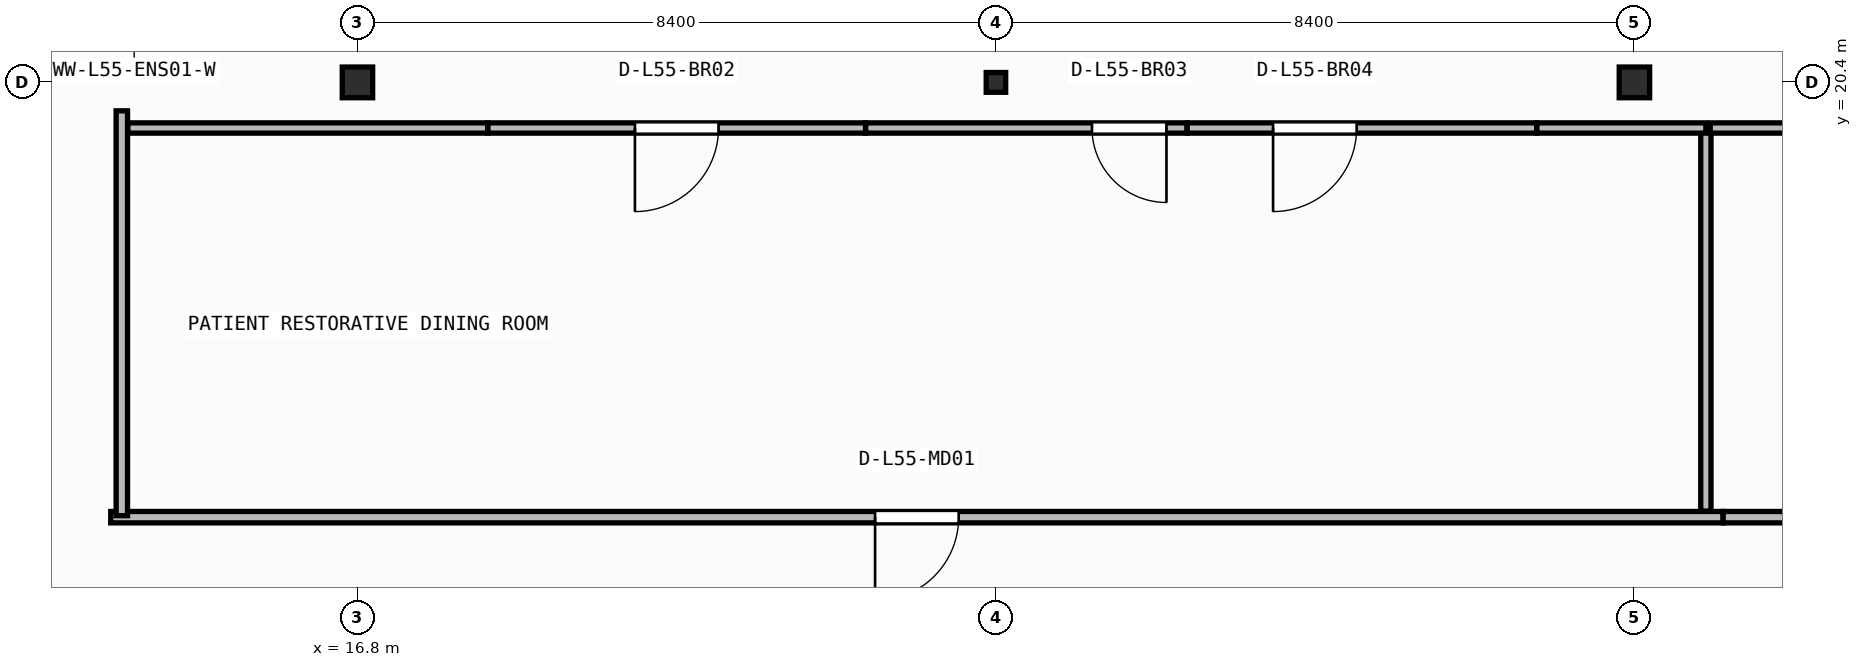
"""IFC4 building model, lengths in metres.
Left out: names, types, materials, properties, quantities, classifications, styles, units other than length and angle.
Written with IfcOpenShell. Run it as: python <this file> out.ifc"""

import sys

from ifc_helpers import new_model, si_unit, direction, frame, frame_2d, origin, origin_2d, place, context, subcontext, project, spatial, rectangle, i_section, extrude, element, fill, save


model = new_model("IFC4")
c1 = context("Model", 3, precision=1e-05, world=origin(), true_north=direction((0.0, 1.0)))
c2 = subcontext(c1, "Body", "Model", "MODEL_VIEW")
j1 = project(units=[si_unit("LENGTHUNIT", "METRE"), si_unit("PLANEANGLEUNIT", "RADIAN")], contexts=[c1])
p1 = place(None, origin())
s1 = spatial("IfcSite", under=j1, at=p1, CompositionType="ELEMENT")
p2 = place(p1, origin())
s2 = spatial("IfcBuilding", under=s1, at=p2, CompositionType="ELEMENT")
p3 = place(p2, frame((0.0, 0.0, 223.7)))
s3 = spatial("IfcBuildingStorey", under=s2, at=p3, CompositionType="ELEMENT", Elevation=223.7)
p4 = place(p3, frame((16.8, 20.4, 0.0), z_axis=(0.0, 0.0, 1.0), x_axis=(1.0, 0.0, 0.0)))
e1 = element("IfcColumn", 1, at=p4, inside=s3, PredefinedType="COLUMN", context=c2, shape_type="SweptSolid", body=[
    extrude(i_section(OverallWidth=0.4, OverallDepth=0.404, WebThickness=0.02, FlangeThickness=0.032, at=origin_2d()), origin(), (0.0, 0.0, 1.0), 3.95),
])
p5 = place(p3, frame((25.2, 20.4, 0.0), z_axis=(0.0, 0.0, 1.0), x_axis=(1.0, 0.0, 0.0)))
e2 = element("IfcColumn", 2, at=p5, inside=s3, PredefinedType="COLUMN", context=c2, shape_type="SweptSolid", body=[
    extrude(i_section(OverallWidth=0.256, OverallDepth=0.26, WebThickness=0.01, FlangeThickness=0.017, FilletRadius=0.013, at=origin_2d()), origin(), (0.0, 0.0, 1.0), 3.95),
])
p6 = place(p3, frame((33.6, 20.4, 0.0), z_axis=(0.0, 0.0, 1.0), x_axis=(1.0, 0.0, 0.0)))
e3 = element("IfcColumn", 3, at=p6, inside=s3, PredefinedType="COLUMN", context=c2, shape_type="SweptSolid", body=[
    extrude(i_section(OverallWidth=0.4, OverallDepth=0.404, WebThickness=0.02, FlangeThickness=0.032, at=origin_2d()), origin(), (0.0, 0.0, 1.0), 3.95),
])
p7 = place(p3, frame((34.766, 14.68, 0.0), z_axis=(0.0, 0.0, 1.0), x_axis=(-1.0, 0.0, 0.0)))
e4 = element("IfcWall", 4, at=p7, inside=s3, PredefinedType="PARTITIONING", context=c2, shape_type="SweptSolid", body=[
    extrude(rectangle(XDim=21.212, YDim=0.15, at=frame_2d((10.606, 0.0))), origin(), (0.0, 0.0, 1.0), 3.71),
])
p8 = place(p7, frame((10.056, 0.0, 0.0)))
e5 = element("IfcOpeningElement", 5, at=p8, cuts=e4, PredefinedType="OPENING", context=c2, shape_type="SweptSolid", body=[
    extrude(rectangle(XDim=1.1, YDim=2.1, at=frame_2d((0.55, 1.05))), frame((0.0, 0.085, 0.0), z_axis=(0.0, -1.0, 0.0), x_axis=(1.0, 0.0, 0.0)), (0.0, 0.0, 1.0), 0.17),
])
p9 = place(p3, frame((51.04, 14.68, 0.0), z_axis=(0.0, 0.0, 1.0), x_axis=(-1.0, 0.0, 0.0)))
e6 = element("IfcWall", 6, at=p9, inside=s3, PredefinedType="PARTITIONING", context=c2, shape_type="SweptSolid", body=[
    extrude(rectangle(XDim=16.272, YDim=0.15, at=frame_2d((8.136, 0.0))), origin(), (0.0, 0.0, 1.0), 3.71),
])
p10 = place(p9, frame((7.586, 0.0, 0.0)))
e7 = element("IfcOpeningElement", 7, at=p10, cuts=e6, PredefinedType="OPENING", context=c2, shape_type="SweptSolid", body=[
    extrude(rectangle(XDim=1.1, YDim=2.1, at=frame_2d((0.55, 1.05))), frame((0.0, 0.085, 0.0), z_axis=(0.0, -1.0, 0.0), x_axis=(1.0, 0.0, 0.0)), (0.0, 0.0, 1.0), 0.17),
])
p11 = place(p3, frame((13.7, 14.7, 0.0), z_axis=(0.0, 0.0, 1.0), x_axis=(0.0, 1.0, 0.0)))
e8 = element("IfcWall", 8, at=p11, inside=s3, PredefinedType="PARTITIONING", context=c2, shape_type="SweptSolid", body=[
    extrude(rectangle(XDim=5.326, YDim=0.15, at=frame_2d((2.663, 0.0))), origin(), (0.0, 0.0, 1.0), 3.71),
])
p12 = place(p3, frame((34.54, 14.76, 0.0), z_axis=(0.0, 0.0, 1.0), x_axis=(0.0, 1.0, 0.0)))
e9 = element("IfcWall", 9, at=p12, inside=s3, PredefinedType="PARTITIONING", context=c2, shape_type="SweptSolid", body=[
    extrude(rectangle(XDim=5.04, YDim=0.135, at=frame_2d((2.52, 0.0))), origin(), (0.0, 0.0, 1.0), 3.71),
])
p13 = place(p3, frame((18.515, 19.8, 0.0), z_axis=(0.0, 0.0, 1.0), x_axis=(-1.0, 0.0, 0.0)))
e10 = element("IfcWall", 10, at=p13, inside=s3, PredefinedType="PARTITIONING", context=c2, shape_type="SweptSolid", body=[
    extrude(rectangle(XDim=4.735, YDim=0.135, at=frame_2d((2.367, 0.0))), origin(), (0.0, 0.0, 1.0), 3.71),
])
p14 = place(p3, frame((23.485, 19.8, 0.0), z_axis=(0.0, 0.0, 1.0), x_axis=(-1.0, 0.0, 0.0)))
e11 = element("IfcWall", 11, at=p14, inside=s3, PredefinedType="PARTITIONING", context=c2, shape_type="SweptSolid", body=[
    extrude(rectangle(XDim=4.968, YDim=0.135, at=frame_2d((2.484, 0.0))), origin(), (0.0, 0.0, 1.0), 3.71),
])
p15 = place(p14, frame((1.934, 0.0, 0.0)))
e12 = element("IfcOpeningElement", 12, at=p15, cuts=e11, PredefinedType="OPENING", context=c2, shape_type="SweptSolid", body=[
    extrude(rectangle(XDim=1.1, YDim=2.1, at=frame_2d((0.55, 1.05))), frame((0.0, 0.077, 0.0), z_axis=(0.0, -1.0, 0.0), x_axis=(1.0, 0.0, 0.0)), (0.0, 0.0, 1.0), 0.155),
])
p16 = place(p3, frame((27.715, 19.8, 0.0), z_axis=(0.0, 0.0, 1.0), x_axis=(-1.0, 0.0, 0.0)))
e13 = element("IfcWall", 13, at=p16, inside=s3, PredefinedType="PARTITIONING", context=c2, shape_type="SweptSolid", body=[
    extrude(rectangle(XDim=4.228, YDim=0.135, at=frame_2d((2.114, 0.0))), origin(), (0.0, 0.0, 1.0), 3.71),
])
p17 = place(p16, frame((0.271, 0.0, 0.0)))
e14 = element("IfcOpeningElement", 14, at=p17, cuts=e13, PredefinedType="OPENING", context=c2, shape_type="SweptSolid", body=[
    extrude(rectangle(XDim=0.98, YDim=2.1, at=frame_2d((0.49, 1.05))), frame((0.0, 0.077, 0.0), z_axis=(0.0, -1.0, 0.0), x_axis=(1.0, 0.0, 0.0)), (0.0, 0.0, 1.0), 0.155),
])
p18 = place(p3, frame((32.315, 19.8, 0.0), z_axis=(0.0, 0.0, 1.0), x_axis=(-1.0, 0.0, 0.0)))
e15 = element("IfcWall", 15, at=p18, inside=s3, PredefinedType="PARTITIONING", context=c2, shape_type="SweptSolid", body=[
    extrude(rectangle(XDim=4.598, YDim=0.135, at=frame_2d((2.299, 0.0))), origin(), (0.0, 0.0, 1.0), 3.71),
])
p19 = place(p18, frame((2.369, 0.0, 0.0)))
e16 = element("IfcOpeningElement", 16, at=p19, cuts=e15, PredefinedType="OPENING", context=c2, shape_type="SweptSolid", body=[
    extrude(rectangle(XDim=1.1, YDim=2.1, at=frame_2d((0.55, 1.05))), frame((0.0, 0.077, 0.0), z_axis=(0.0, -1.0, 0.0), x_axis=(1.0, 0.0, 0.0)), (0.0, 0.0, 1.0), 0.155),
])
p20 = place(p3, frame((34.54, 19.8, 0.0), z_axis=(0.0, 0.0, 1.0), x_axis=(-1.0, 0.0, 0.0)))
e17 = element("IfcWall", 17, at=p20, inside=s3, PredefinedType="PARTITIONING", context=c2, shape_type="SweptSolid", body=[
    extrude(rectangle(XDim=2.223, YDim=0.135, at=frame_2d((1.112, 0.0))), origin(), (0.0, 0.0, 1.0), 3.71),
])
p21 = place(p3, frame((37.285, 19.8, 0.0), z_axis=(0.0, 0.0, 1.0), x_axis=(-1.0, 0.0, 0.0)))
e18 = element("IfcWall", 18, at=p21, inside=s3, PredefinedType="PARTITIONING", context=c2, shape_type="SweptSolid", body=[
    extrude(rectangle(XDim=2.687, YDim=0.135, at=frame_2d((1.344, 0.0))), origin(), (0.0, 0.0, 1.0), 3.71),
])
p22 = place(p21, frame((0.23, 0.0, 0.0)))
e19 = element("IfcOpeningElement", 19, at=p22, cuts=e18, PredefinedType="OPENING", context=c2, shape_type="SweptSolid", body=[
    extrude(rectangle(XDim=1.1, YDim=2.1, at=frame_2d((0.55, 1.05))), frame((0.0, 0.077, 0.0), z_axis=(0.0, -1.0, 0.0), x_axis=(1.0, 0.0, 0.0)), (0.0, 0.0, 1.0), 0.155),
])
p23 = place(p8, origin())
e20 = element("IfcDoor", 20, at=p23, inside=s3, OperationType="SINGLE_SWING_RIGHT", PredefinedType="DOOR", context=c2, shape_type="SweptSolid", body=[
    extrude(rectangle(XDim=1.1, YDim=2.1, at=frame_2d((0.55, 1.05))), frame((0.0, 0.025, 0.0), z_axis=(0.0, -1.0, 0.0), x_axis=(1.0, 0.0, 0.0)), (0.0, 0.0, 1.0), 0.05),
])
fill(e5, e20)
p24 = place(p15, origin())
e21 = element("IfcDoor", 21, at=p24, inside=s3, OperationType="SINGLE_SWING_RIGHT", PredefinedType="DOOR", context=c2, shape_type="SweptSolid", body=[
    extrude(rectangle(XDim=1.1, YDim=2.1, at=frame_2d((0.55, 1.05))), frame((0.0, 0.025, 0.0), z_axis=(0.0, -1.0, 0.0), x_axis=(1.0, 0.0, 0.0)), (0.0, 0.0, 1.0), 0.05),
])
fill(e12, e21)
p25 = place(p17, origin())
e22 = element("IfcDoor", 22, at=p25, inside=s3, OperationType="SINGLE_SWING_LEFT", PredefinedType="DOOR", context=c2, shape_type="SweptSolid", body=[
    extrude(rectangle(XDim=0.98, YDim=2.1, at=frame_2d((0.49, 1.05))), frame((0.0, 0.025, 0.0), z_axis=(0.0, -1.0, 0.0), x_axis=(1.0, 0.0, 0.0)), (0.0, 0.0, 1.0), 0.05),
])
fill(e14, e22)
p26 = place(p19, origin())
e23 = element("IfcDoor", 23, at=p26, inside=s3, OperationType="SINGLE_SWING_RIGHT", PredefinedType="DOOR", context=c2, shape_type="SweptSolid", body=[
    extrude(rectangle(XDim=1.1, YDim=2.1, at=frame_2d((0.55, 1.05))), frame((0.0, 0.025, 0.0), z_axis=(0.0, -1.0, 0.0), x_axis=(1.0, 0.0, 0.0)), (0.0, 0.0, 1.0), 0.05),
])
fill(e16, e23)
save(model, sys.argv[1])
